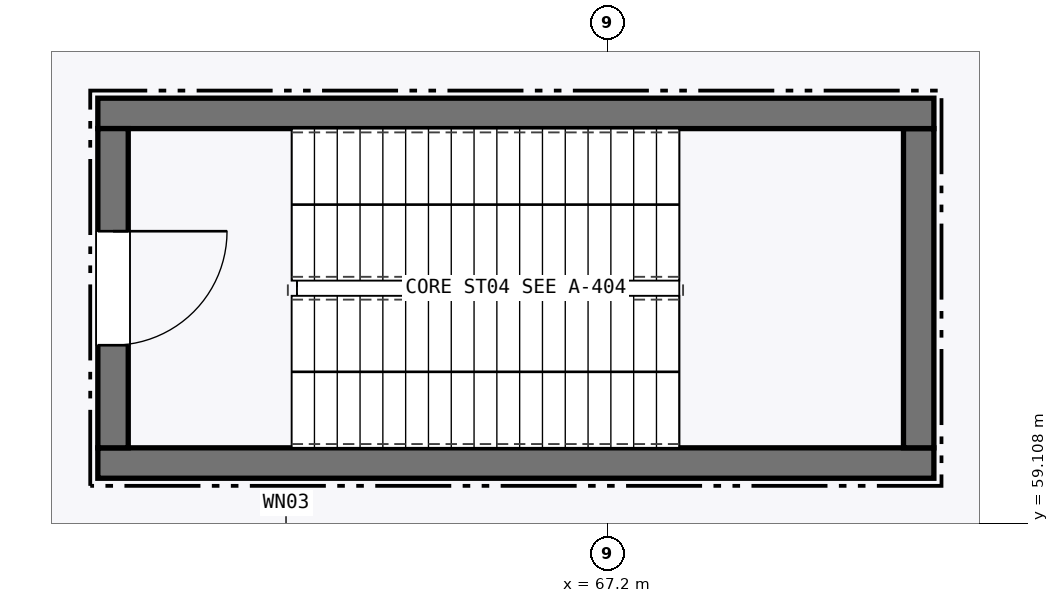
"""IFC4 building model, lengths in metres.
Left out: names, types, materials, properties, quantities, classifications, styles, units other than length and angle.
Written with IfcOpenShell. Run it as: python <this file> out.ifc"""

import sys

from ifc_helpers import new_model, si_unit, direction, frame, frame_2d, origin, place, context, subcontext, project, spatial, rectangle, extrude, element, fill, save


model = new_model("IFC4")
c1 = context("Model", 3, precision=1e-05, world=origin(), true_north=direction((0.0, 1.0)))
c2 = subcontext(c1, "Body", "Model", "MODEL_VIEW")
j1 = project(units=[si_unit("LENGTHUNIT", "METRE"), si_unit("PLANEANGLEUNIT", "RADIAN")], contexts=[c1])
p1 = place(None, origin())
s1 = spatial("IfcSite", under=j1, at=p1, CompositionType="ELEMENT")
p2 = place(p1, origin())
s2 = spatial("IfcBuilding", under=s1, at=p2, CompositionType="ELEMENT")
p3 = place(p2, frame((0.0, 0.0, 6.0)))
s3 = spatial("IfcBuildingStorey", under=s2, at=p3, CompositionType="ELEMENT", Elevation=6.0)
p4 = place(p3, frame((60.5, 59.9, 0.0), z_axis=(0.0, 0.0, 1.0), x_axis=(1.0, 0.0, 0.0)))
e1 = element("IfcWall", 1, at=p4, inside=s3, PredefinedType="SHEAR", context=c2, shape_type="SweptSolid", body=[
    extrude(rectangle(XDim=11.0, YDim=0.4, at=frame_2d((5.5, 0.0))), origin(), (0.0, 0.0, 1.0), 5.145),
])
p5 = place(p3, frame((71.3, 60.1, 0.0), z_axis=(0.0, 0.0, 1.0), x_axis=(0.0, 1.0, 0.0)))
e2 = element("IfcWall", 2, at=p5, inside=s3, PredefinedType="SHEAR", context=c2, shape_type="SweptSolid", body=[
    extrude(rectangle(XDim=4.2, YDim=0.4, at=frame_2d((2.1, 0.0))), origin(), (0.0, 0.0, 1.0), 5.145),
])
p6 = place(p3, frame((71.5, 64.5, 0.0), z_axis=(0.0, 0.0, 1.0), x_axis=(-1.0, 0.0, 0.0)))
e3 = element("IfcWall", 3, at=p6, inside=s3, PredefinedType="SHEAR", context=c2, shape_type="SweptSolid", body=[
    extrude(rectangle(XDim=11.0, YDim=0.4, at=frame_2d((5.5, 0.0))), origin(), (0.0, 0.0, 1.0), 5.145),
])
p7 = place(p3, frame((60.7, 64.3, 0.0), z_axis=(0.0, 0.0, 1.0), x_axis=(0.0, -1.0, 0.0)))
e4 = element("IfcWall", 4, at=p7, inside=s3, PredefinedType="SHEAR", context=c2, shape_type="SweptSolid", body=[
    extrude(rectangle(XDim=4.2, YDim=0.4, at=frame_2d((2.1, 0.0))), origin(), (0.0, 0.0, 1.0), 5.145),
])
p8 = place(p7, frame((1.35, 0.0, 0.0)))
e5 = element("IfcOpeningElement", 5, at=p8, cuts=e4, PredefinedType="OPENING", context=c2, shape_type="SweptSolid", body=[
    extrude(rectangle(XDim=1.5, YDim=2.15, at=frame_2d((0.75, 1.075))), frame((0.0, 0.21, 0.0), z_axis=(0.0, -1.0, 0.0), x_axis=(1.0, 0.0, 0.0)), (0.0, 0.0, 1.0), 0.42),
])
p9 = place(p8, origin())
e6 = element("IfcDoor", 6, at=p9, inside=s3, OperationType="SINGLE_SWING_LEFT", PredefinedType="DOOR", context=c2, shape_type="SweptSolid", body=[
    extrude(rectangle(XDim=1.5, YDim=2.15, at=frame_2d((0.75, 1.075))), frame((0.0, 0.025, 0.0), z_axis=(0.0, -1.0, 0.0), x_axis=(1.0, 0.0, 0.0)), (0.0, 0.0, 1.0), 0.05),
])
fill(e5, e6)
save(model, sys.argv[1])
